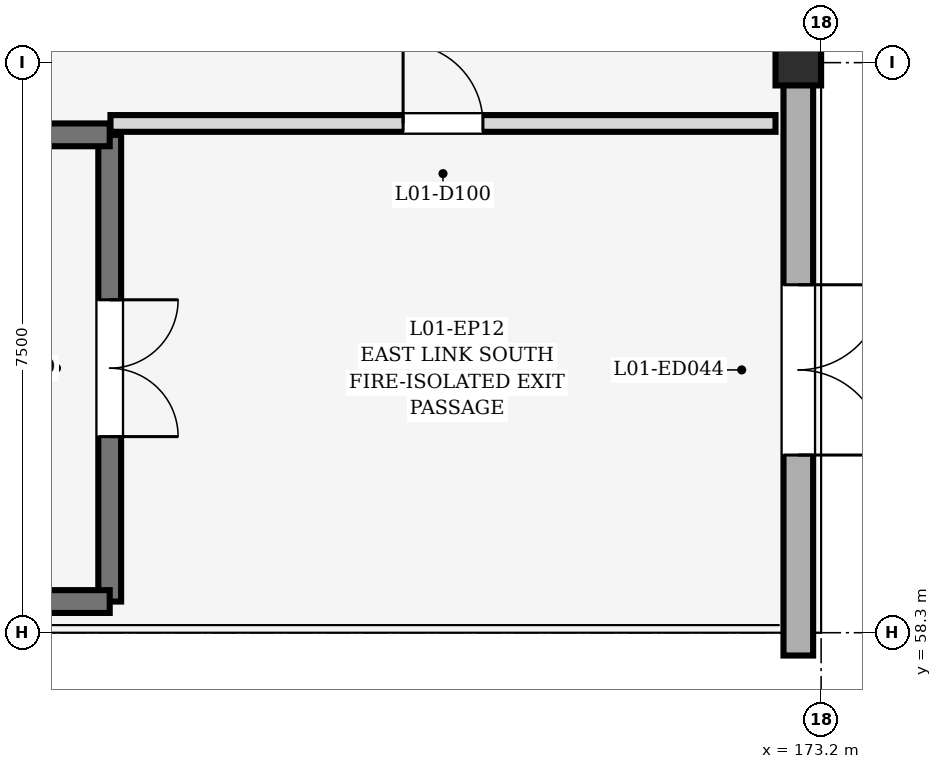
"""IFC4 building model, lengths in metres.
Left out: names, types, materials, properties, quantities, classifications, styles, units other than length and angle.
Written with IfcOpenShell. Run it as: python <this file> out.ifc"""

import sys

from ifc_helpers import new_model, si_unit, direction, frame, frame_2d, origin, origin_2d, place, context, subcontext, project, spatial, rectangle, extrude, element, fill, save


model = new_model("IFC4")
c1 = context("Model", 3, precision=1e-05, world=origin(), true_north=direction((0.0, 1.0)))
c2 = subcontext(c1, "Body", "Model", "MODEL_VIEW")
j1 = project(units=[si_unit("LENGTHUNIT", "METRE"), si_unit("PLANEANGLEUNIT", "RADIAN")], contexts=[c1])
p1 = place(None, origin())
s1 = spatial("IfcSite", under=j1, at=p1, CompositionType="ELEMENT")
p2 = place(p1, origin())
s2 = spatial("IfcBuilding", under=s1, at=p2, CompositionType="ELEMENT")
p3 = place(p2, origin())
s3 = spatial("IfcBuildingStorey", under=s2, at=p3, CompositionType="ELEMENT", Elevation=0.0)
p4 = place(p3, frame((172.9, 65.8, 0.0), z_axis=(0.0, 0.0, 1.0), x_axis=(1.0, 0.0, 0.0)))
e1 = element("IfcColumn", 1, at=p4, inside=s3, PredefinedType="COLUMN", context=c2, shape_type="SweptSolid", body=[
    extrude(rectangle(XDim=0.6, YDim=0.6, at=origin_2d()), origin(), (0.0, 0.0, 1.0), 5.4),
])
p5 = place(p3, frame((172.9, 65.515, 0.0), z_axis=(0.0, 0.0, 1.0), x_axis=(0.0, -1.0, 0.0)))
e2 = element("IfcWall", 2, at=p5, inside=s3, PredefinedType="STANDARD", context=c2, shape_type="SweptSolid", body=[
    extrude(rectangle(XDim=7.515, YDim=0.39, at=frame_2d((3.757, 0.0))), origin(), (0.0, 0.0, 1.0), 4.6),
])
p6 = place(p5, frame((2.637, 0.0, 0.0)))
e3 = element("IfcOpeningElement", 3, at=p6, cuts=e2, PredefinedType="OPENING", context=c2, shape_type="SweptSolid", body=[
    extrude(rectangle(XDim=2.24, YDim=2.35, at=frame_2d((1.12, 1.175))), frame((0.0, 0.207, 0.0), z_axis=(0.0, -1.0, 0.0), x_axis=(1.0, 0.0, 0.0)), (0.0, 0.0, 1.0), 0.414),
])
p7 = place(p3, frame((163.84, 64.85, 0.0), z_axis=(0.0, 0.0, 1.0), x_axis=(0.0, -1.0, 0.0)))
e4 = element("IfcWall", 4, at=p7, inside=s3, PredefinedType="SHEAR", context=c2, shape_type="SweptSolid", body=[
    extrude(rectangle(XDim=6.14, YDim=0.3, at=frame_2d((3.07, 0.0))), origin(), (0.0, 0.0, 1.0), 5.14),
])
p8 = place(p7, frame((2.17, 0.0, 0.0)))
e5 = element("IfcOpeningElement", 5, at=p8, cuts=e4, PredefinedType="OPENING", context=c2, shape_type="SweptSolid", body=[
    extrude(rectangle(XDim=1.8, YDim=2.2, at=frame_2d((0.9, 1.1))), frame((0.0, 0.162, 0.0), z_axis=(0.0, -1.0, 0.0), x_axis=(1.0, 0.0, 0.0)), (0.0, 0.0, 1.0), 0.324),
])
for number, where, z_axis, x_axis in (
    (6, (152.16, 64.85, 0.0), (0.0, 0.0, 1.0), (1.0, 0.0, 0.0)),
    (7, (163.84, 58.71, 0.0), (0.0, 0.0, 1.0), (-1.0, 0.0, 0.0)),
):
    element("IfcWall", number, at=place(p3, frame(where, z_axis=z_axis, x_axis=x_axis)), inside=s3, PredefinedType="SHEAR", context=c2, shape_type="SweptSolid", body=[
        extrude(rectangle(XDim=11.68, YDim=0.3, at=frame_2d((5.84, 0.0))), origin(), (0.0, 0.0, 1.0), 5.14),
    ])
p9 = place(p3, frame((163.85, 65.0, 0.0), z_axis=(0.0, 0.0, 1.0), x_axis=(1.0, 0.0, 0.0)))
e8 = element("IfcWall", 8, at=p9, inside=s3, PredefinedType="SOLIDWALL", context=c2, shape_type="SweptSolid", body=[
    extrude(rectangle(XDim=8.75, YDim=0.22, at=frame_2d((4.375, 0.0))), origin(), (0.0, 0.0, 1.0), 5.125),
])
p10 = place(p9, frame((3.85, 0.0, 0.0)))
e9 = element("IfcOpeningElement", 9, at=p10, cuts=e8, PredefinedType="OPENING", context=c2, shape_type="SweptSolid", body=[
    extrude(rectangle(XDim=1.05, YDim=2.15, at=frame_2d((0.525, 1.075))), frame((0.0, 0.122, 0.0), z_axis=(0.0, -1.0, 0.0), x_axis=(1.0, 0.0, 0.0)), (0.0, 0.0, 1.0), 0.244),
])
p11 = place(p6, origin())
e10 = element("IfcDoor", 10, at=p11, inside=s3, OperationType="DOUBLE_DOOR_SINGLE_SWING", PredefinedType="DOOR", context=c2, shape_type="SweptSolid", body=[
    extrude(rectangle(XDim=2.24, YDim=2.35, at=frame_2d((1.12, 1.175))), frame((0.0, 0.025, 0.0), z_axis=(0.0, -1.0, 0.0), x_axis=(1.0, 0.0, 0.0)), (0.0, 0.0, 1.0), 0.05),
])
fill(e3, e10)
p12 = place(p8, origin())
e11 = element("IfcDoor", 11, at=p12, inside=s3, OperationType="DOUBLE_DOOR_SINGLE_SWING", PredefinedType="DOOR", context=c2, shape_type="SweptSolid", body=[
    extrude(rectangle(XDim=1.8, YDim=2.2, at=frame_2d((0.9, 1.1))), frame((0.0, 0.025, 0.0), z_axis=(0.0, -1.0, 0.0), x_axis=(1.0, 0.0, 0.0)), (0.0, 0.0, 1.0), 0.05),
])
fill(e5, e11)
p13 = place(p10, origin())
e12 = element("IfcDoor", 12, at=p13, inside=s3, OperationType="SINGLE_SWING_LEFT", PredefinedType="DOOR", context=c2, shape_type="SweptSolid", body=[
    extrude(rectangle(XDim=1.05, YDim=2.15, at=frame_2d((0.525, 1.075))), frame((0.0, 0.025, 0.0), z_axis=(0.0, -1.0, 0.0), x_axis=(1.0, 0.0, 0.0)), (0.0, 0.0, 1.0), 0.05),
])
fill(e9, e12)
save(model, sys.argv[1])
